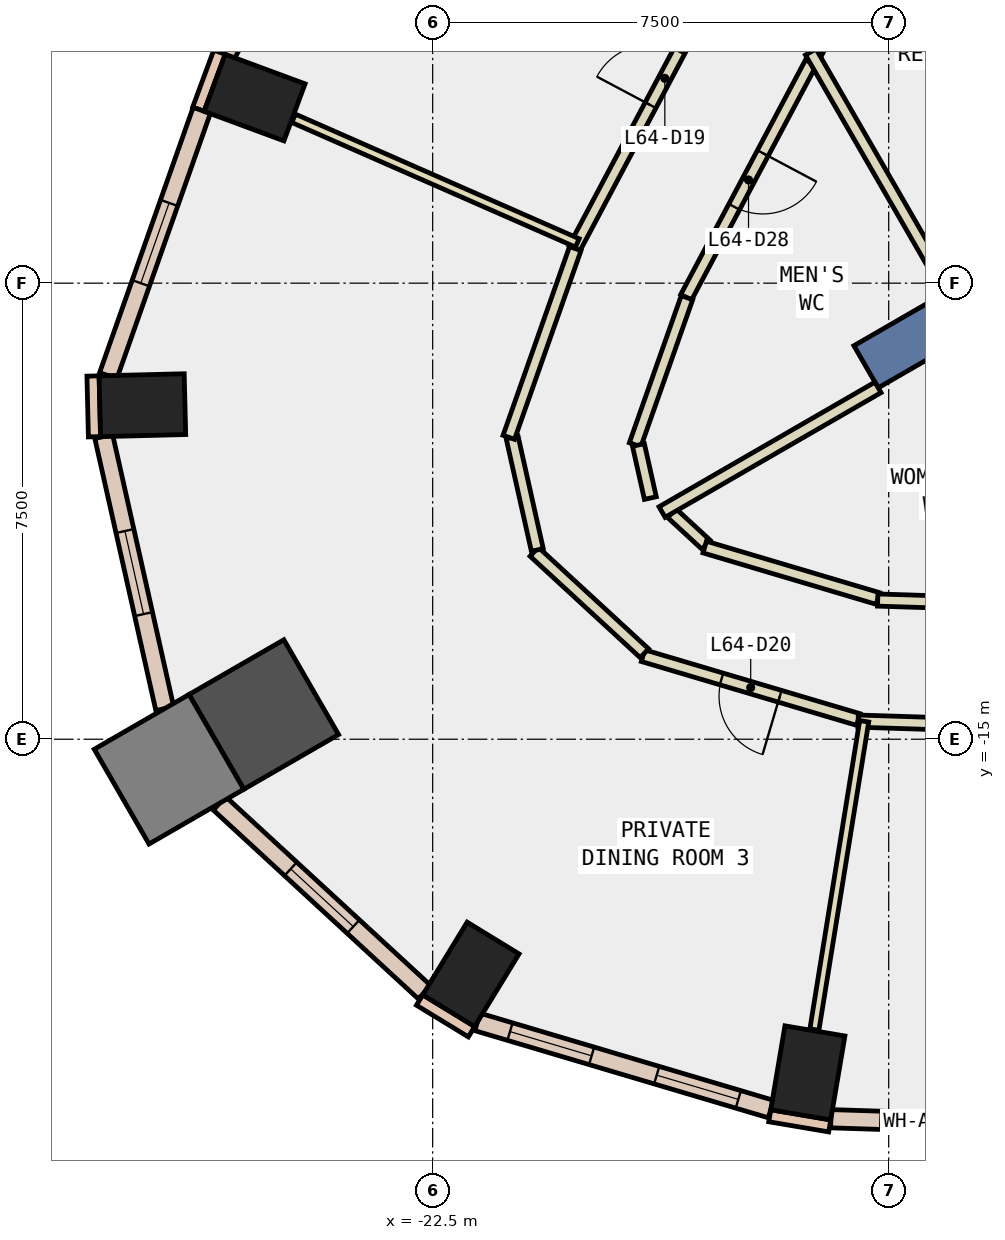
"""IFC4 building model, lengths in metres.
Left out: names, types, materials, properties, quantities, classifications, styles, units other than length and angle.
Written with IfcOpenShell. Run it as: python <this file> out.ifc"""

import sys

from ifc_helpers import new_model, si_unit, direction, frame, frame_2d, origin, origin_2d, place, context, subcontext, project, spatial, rectangle, extrude, element, fill, save


model = new_model("IFC4")
c1 = context("Model", 3, precision=1e-05, world=origin(), true_north=direction((0.0, 1.0)))
c2 = subcontext(c1, "Body", "Model", "MODEL_VIEW")
j1 = project(units=[si_unit("LENGTHUNIT", "METRE"), si_unit("PLANEANGLEUNIT", "RADIAN")], contexts=[c1])
p1 = place(None, origin())
s1 = spatial("IfcSite", under=j1, at=p1, CompositionType="ELEMENT")
p2 = place(p1, origin())
s2 = spatial("IfcBuilding", under=s1, at=p2, CompositionType="ELEMENT")
p3 = place(p2, frame((0.0, 0.0, 277.4)))
s3 = spatial("IfcBuildingStorey", under=s2, at=p3, CompositionType="ELEMENT", Elevation=277.4)
for number, where, z_axis, x_axis in (
    (1, (-16.33, -20.487, -0.34), (0.0, 0.0, 1.0), (-0.986, 0.167, 0.0)),
    (2, (-25.429, -4.448, -0.34), (0.0, 0.0, 1.0), (0.347, 0.938, 0.0)),
    (3, (-27.274, -9.507, -0.34), (0.0, 0.0, 1.0), (-0.025, 1.0, 0.0)),
):
    element("IfcColumn", number, at=place(p3, frame(where, z_axis=z_axis, x_axis=x_axis)), inside=s3, PredefinedType="COLUMN", context=c2, shape_type="SweptSolid", body=[
        extrude(rectangle(XDim=1.0, YDim=1.4, at=origin_2d()), origin(), (0.0, 0.0, 1.0), 3.34),
    ])
p4 = place(p3, frame((-25.277, -14.594, -0.34), z_axis=(0.0, 0.0, 1.0), x_axis=(0.866025403784, 0.5, 0.0)))
e4 = element("IfcColumn", 4, at=p4, inside=s3, PredefinedType="COLUMN", context=c2, shape_type="SweptSolid", body=[
    extrude(rectangle(XDim=1.8, YDim=1.8, at=origin_2d()), origin(), (0.0, 0.0, 1.0), 3.34),
])
p5 = place(p3, frame((-21.871, -18.867, -0.34), z_axis=(0.0, 0.0, 1.0), x_axis=(-0.853341581839, 0.521352227103, 0.0)))
e5 = element("IfcColumn", 5, at=p5, inside=s3, PredefinedType="COLUMN", context=c2, shape_type="SweptSolid", body=[
    extrude(rectangle(XDim=1.0, YDim=1.4, at=origin_2d()), origin(), (0.0, 0.0, 1.0), 3.34),
])
p6 = place(p3, frame((-26.836, -15.494, -0.34), z_axis=(0.0, 0.0, 1.0), x_axis=(0.866025403784, 0.5, 0.0)))
e6 = element("IfcColumn", 6, at=p6, inside=s3, PredefinedType="COLUMN", context=c2, shape_type="SweptSolid", body=[
    extrude(rectangle(XDim=1.8, YDim=1.8, at=origin_2d()), origin(), (0.0, 0.0, 1.0), 3.34),
])
p7 = place(p3, frame((-7.578, -4.375, -0.34), z_axis=(0.0, 0.0, 1.0), x_axis=(-0.866024315419, -0.5000018851, 0.0)))
e7 = element("IfcWall", 7, at=p7, inside=s3, PredefinedType="SHEAR", context=c2, shape_type="SweptSolid", body=[
    extrude(rectangle(XDim=9.0, YDim=0.8, at=frame_2d((4.5, 0.0))), origin(), (0.0, 0.0, 1.0), 3.34),
])
p8 = place(p3, frame((-26.006, -3.702, 0.0), z_axis=(0.0, 0.0, 1.0), x_axis=(-0.346892928577, -0.937904737222, 0.0)))
e8 = element("IfcWall", 8, at=p8, inside=s3, PredefinedType="STANDARD", context=c2, shape_type="SweptSolid", body=[
    extrude(rectangle(XDim=1.0, YDim=0.2, at=frame_2d((0.5, 0.0))), origin(), (0.0, 0.0, 1.0), 3.0),
])
p9 = place(p3, frame((-16.956, -21.192, 0.0), z_axis=(0.0, 0.0, 1.0), x_axis=(0.985961725342, -0.166971483074, 0.0)))
e9 = element("IfcWall", 9, at=p9, inside=s3, PredefinedType="STANDARD", context=c2, shape_type="SweptSolid", body=[
    extrude(rectangle(XDim=1.0, YDim=0.2, at=frame_2d((0.5, 0.0))), origin(), (0.0, 0.0, 1.0), 3.0),
])
p10 = place(p3, frame((-28.086, -9.027, 0.0), z_axis=(0.0, 0.0, 1.0), x_axis=(0.023948152966, -0.999713201858, 0.0)))
e10 = element("IfcWall", 10, at=p10, inside=s3, PredefinedType="STANDARD", context=c2, shape_type="SweptSolid", body=[
    extrude(rectangle(XDim=0.999, YDim=0.2, at=frame_2d((0.5, 0.0))), origin(), (0.0, 0.0, 1.0), 3.0),
])
p11 = place(p3, frame((-22.715, -19.289, 0.0), z_axis=(0.0, 0.0, 1.0), x_axis=(0.853679739553, -0.520798331677, 0.0)))
e11 = element("IfcWall", 11, at=p11, inside=s3, PredefinedType="STANDARD", context=c2, shape_type="SweptSolid", body=[
    extrude(rectangle(XDim=1.0, YDim=0.2, at=frame_2d((0.5, 0.0))), origin(), (0.0, 0.0, 1.0), 3.0),
])
p12 = place(p3, frame((-15.951, -21.241, 0.0), z_axis=(0.0, 0.0, 1.0), x_axis=(0.999496876383, -0.031717410046, 0.0)))
e12 = element("IfcWall", 12, at=p12, inside=s3, PredefinedType="STANDARD", context=c2, shape_type="SweptSolid", body=[
    extrude(rectangle(XDim=7.659, YDim=0.3, at=frame_2d((3.83, 0.0))), origin(), (0.0, 0.0, 1.0), 3.0),
])
p13 = place(p12, frame((0.815, 0.0, 0.9)))
e13 = element("IfcOpeningElement", 13, at=p13, cuts=e12, PredefinedType="OPENING", context=c2, shape_type="SweptSolid", body=[
    extrude(rectangle(XDim=2.2, YDim=2.0, at=frame_2d((1.1, 1.0))), frame((0.0, 0.16, 0.0), z_axis=(0.0, -1.0, 0.0), x_axis=(1.0, 0.0, 0.0)), (0.0, 0.0, 1.0), 0.32),
])
p14 = place(p12, frame((4.644, 0.0, 0.9)))
e14 = element("IfcOpeningElement", 14, at=p14, cuts=e12, PredefinedType="OPENING", context=c2, shape_type="SweptSolid", body=[
    extrude(rectangle(XDim=2.2, YDim=2.0, at=frame_2d((1.1, 1.0))), frame((0.0, 0.16, 0.0), z_axis=(0.0, -1.0, 0.0), x_axis=(1.0, 0.0, 0.0)), (0.0, 0.0, 1.0), 0.32),
])
p15 = place(p3, frame((-23.186, 1.348, 0.0), z_axis=(0.0, 0.0, 1.0), x_axis=(-0.469691596427, -0.882830563724, 0.0)))
e15 = element("IfcWall", 15, at=p15, inside=s3, PredefinedType="STANDARD", context=c2, shape_type="SweptSolid", body=[
    extrude(rectangle(XDim=5.768, YDim=0.3, at=frame_2d((2.884, 0.0))), origin(), (0.0, 0.0, 1.0), 3.0),
])
p16 = place(p15, frame((0.492, 0.0, 0.9)))
e16 = element("IfcOpeningElement", 16, at=p16, cuts=e15, PredefinedType="OPENING", context=c2, shape_type="SweptSolid", body=[
    extrude(rectangle(XDim=1.9, YDim=2.0, at=frame_2d((0.95, 1.0))), frame((0.0, 0.16, 0.0), z_axis=(0.0, -1.0, 0.0), x_axis=(1.0, 0.0, 0.0)), (0.0, 0.0, 1.0), 0.32),
])
p17 = place(p15, frame((3.376, 0.0, 0.9)))
e17 = element("IfcOpeningElement", 17, at=p17, cuts=e15, PredefinedType="OPENING", context=c2, shape_type="SweptSolid", body=[
    extrude(rectangle(XDim=1.9, YDim=2.0, at=frame_2d((0.95, 1.0))), frame((0.0, 0.16, 0.0), z_axis=(0.0, -1.0, 0.0), x_axis=(1.0, 0.0, 0.0)), (0.0, 0.0, 1.0), 0.32),
])
p18 = place(p3, frame((-26.298, -4.659, 0.0), z_axis=(0.0, 0.0, 1.0), x_axis=(-0.332491532378, -0.943106240514, 0.0)))
e18 = element("IfcWall", 18, at=p18, inside=s3, PredefinedType="STANDARD", context=c2, shape_type="SweptSolid", body=[
    extrude(rectangle(XDim=4.625, YDim=0.3, at=frame_2d((2.312, 0.0))), origin(), (0.0, 0.0, 1.0), 3.0),
])
p19 = place(p18, frame((1.613, 0.0, 0.9)))
e19 = element("IfcOpeningElement", 19, at=p19, cuts=e18, PredefinedType="OPENING", context=c2, shape_type="SweptSolid", body=[
    extrude(rectangle(XDim=1.4, YDim=2.0, at=frame_2d((0.7, 1.0))), frame((0.0, 0.16, 0.0), z_axis=(0.0, -1.0, 0.0), x_axis=(1.0, 0.0, 0.0)), (0.0, 0.0, 1.0), 0.32),
])
p20 = place(p3, frame((-27.91, -10.022, 0.0), z_axis=(0.0, 0.0, 1.0), x_axis=(0.218936963279, -0.975739005119, 0.0)))
e20 = element("IfcWall", 20, at=p20, inside=s3, PredefinedType="STANDARD", context=c2, shape_type="SweptSolid", body=[
    extrude(rectangle(XDim=4.585, YDim=0.3, at=frame_2d((2.293, 0.0))), origin(), (0.0, 0.0, 1.0), 3.0),
])
p21 = place(p20, frame((1.593, 0.0, 0.9)))
e21 = element("IfcOpeningElement", 21, at=p21, cuts=e20, PredefinedType="OPENING", context=c2, shape_type="SweptSolid", body=[
    extrude(rectangle(XDim=1.4, YDim=2.0, at=frame_2d((0.7, 1.0))), frame((0.0, 0.16, 0.0), z_axis=(0.0, -1.0, 0.0), x_axis=(1.0, 0.0, 0.0)), (0.0, 0.0, 1.0), 0.32),
])
p22 = place(p3, frame((-26.007, -16.054, 0.0), z_axis=(0.0, 0.0, 1.0), x_axis=(0.735631679486, -0.677381747714, 0.0)))
e22 = element("IfcWall", 22, at=p22, inside=s3, PredefinedType="STANDARD", context=c2, shape_type="SweptSolid", body=[
    extrude(rectangle(XDim=4.585, YDim=0.3, at=frame_2d((2.292, 0.0))), origin(), (0.0, 0.0, 1.0), 3.0),
])
p23 = place(p22, frame((1.593, 0.0, 0.9)))
e23 = element("IfcOpeningElement", 23, at=p23, cuts=e22, PredefinedType="OPENING", context=c2, shape_type="SweptSolid", body=[
    extrude(rectangle(XDim=1.4, YDim=2.0, at=frame_2d((0.7, 1.0))), frame((0.0, 0.16, 0.0), z_axis=(0.0, -1.0, 0.0), x_axis=(1.0, 0.0, 0.0)), (0.0, 0.0, 1.0), 0.32),
])
p24 = place(p3, frame((-21.764, -19.649, 0.0), z_axis=(0.0, 0.0, 1.0), x_axis=(0.95864045837, -0.284619872067, 0.0)))
e24 = element("IfcWall", 24, at=p24, inside=s3, PredefinedType="STANDARD", context=c2, shape_type="SweptSolid", body=[
    extrude(rectangle(XDim=5.035, YDim=0.3, at=frame_2d((2.518, 0.0))), origin(), (0.0, 0.0, 1.0), 3.0),
])
p25 = place(p24, frame((0.559, 0.0, 0.9)))
e25 = element("IfcOpeningElement", 25, at=p25, cuts=e24, PredefinedType="OPENING", context=c2, shape_type="SweptSolid", body=[
    extrude(rectangle(XDim=1.4, YDim=2.0, at=frame_2d((0.7, 1.0))), frame((0.0, 0.16, 0.0), z_axis=(0.0, -1.0, 0.0), x_axis=(1.0, 0.0, 0.0)), (0.0, 0.0, 1.0), 0.32),
])
p26 = place(p24, frame((3.076, 0.0, 0.9)))
e26 = element("IfcOpeningElement", 26, at=p26, cuts=e24, PredefinedType="OPENING", context=c2, shape_type="SweptSolid", body=[
    extrude(rectangle(XDim=1.4, YDim=2.0, at=frame_2d((0.7, 1.0))), frame((0.0, 0.16, 0.0), z_axis=(0.0, -1.0, 0.0), x_axis=(1.0, 0.0, 0.0)), (0.0, 0.0, 1.0), 0.32),
])
p27 = place(p3, frame((-15.439, -2.293, 0.0), z_axis=(0.0, 0.0, 1.0), x_axis=(-0.469248780065, -0.883066012486, 0.0)))
e27 = element("IfcWall", 27, at=p27, inside=s3, PredefinedType="PARTITIONING", context=c2, shape_type="SweptSolid", body=[
    extrude(rectangle(XDim=1.59, YDim=0.2, at=frame_2d((0.795, 0.0))), origin(), (0.0, 0.0, 1.0), 3.0),
])
p28 = place(p3, frame((-16.279, -3.873, 0.0), z_axis=(0.0, 0.0, 1.0), x_axis=(-0.469587967357, -0.882885689608, 0.0)))
e28 = element("IfcWall", 28, at=p28, inside=s3, PredefinedType="PARTITIONING", context=c2, shape_type="SweptSolid", body=[
    extrude(rectangle(XDim=4.372, YDim=0.2, at=frame_2d((2.186, 0.0))), origin(), (0.0, 0.0, 1.0), 3.0),
])
p29 = place(p28, frame((1.686, 0.0, 0.0)))
e29 = element("IfcOpeningElement", 29, at=p29, cuts=e28, PredefinedType="OPENING", context=c2, shape_type="SweptSolid", body=[
    extrude(rectangle(XDim=1.0, YDim=2.1, at=frame_2d((0.5, 1.05))), frame((0.0, 0.11, 0.0), z_axis=(0.0, -1.0, 0.0), x_axis=(1.0, 0.0, 0.0)), (0.0, 0.0, 1.0), 0.22),
])
p30 = place(p3, frame((-18.318, -7.739, 0.0), z_axis=(0.0, 0.0, 1.0), x_axis=(-0.332486504777, -0.943108012977, 0.0)))
e30 = element("IfcWall", 30, at=p30, inside=s3, PredefinedType="PARTITIONING", context=c2, shape_type="SweptSolid", body=[
    extrude(rectangle(XDim=2.565, YDim=0.2, at=frame_2d((1.282, 0.0))), origin(), (0.0, 0.0, 1.0), 3.0),
])
p31 = place(p3, frame((-19.116, -10.161, 0.0), z_axis=(0.0, 0.0, 1.0), x_axis=(0.219096654714, -0.975703159723, 0.0)))
e31 = element("IfcWall", 31, at=p31, inside=s3, PredefinedType="PARTITIONING", context=c2, shape_type="SweptSolid", body=[
    extrude(rectangle(XDim=0.895, YDim=0.2, at=frame_2d((0.447, 0.0))), origin(), (0.0, 0.0, 1.0), 3.0),
])
p32 = place(p3, frame((-18.567, -11.282, 0.0), z_axis=(0.0, 0.0, 1.0), x_axis=(0.735218904444, -0.677829744514, 0.0)))
e32 = element("IfcWall", 32, at=p32, inside=s3, PredefinedType="PARTITIONING", context=c2, shape_type="SweptSolid", body=[
    extrude(rectangle(XDim=0.766, YDim=0.2, at=frame_2d((0.383, 0.0))), origin(), (0.0, 0.0, 1.0), 3.0),
])
p33 = place(p3, frame((-18.026, -11.84, 0.0), z_axis=(0.0, 0.0, 1.0), x_axis=(0.958629704259, -0.284656090947, 0.0)))
e33 = element("IfcWall", 33, at=p33, inside=s3, PredefinedType="PARTITIONING", context=c2, shape_type="SweptSolid", body=[
    extrude(rectangle(XDim=2.972, YDim=0.2, at=frame_2d((1.486, 0.0))), origin(), (0.0, 0.0, 1.0), 3.0),
])
p34 = place(p3, frame((-15.181, -12.711, 0.0), z_axis=(0.0, 0.0, 1.0), x_axis=(0.999491493959, -0.031886572471, 0.0)))
e34 = element("IfcWall", 34, at=p34, inside=s3, PredefinedType="PARTITIONING", context=c2, shape_type="SweptSolid", body=[
    extrude(rectangle(XDim=4.081, YDim=0.2, at=frame_2d((2.041, 0.0))), origin(), (0.0, 0.0, 1.0), 3.0),
])
p35 = place(p34, frame((1.541, 0.0, 0.0)))
e35 = element("IfcOpeningElement", 35, at=p35, cuts=e34, PredefinedType="OPENING", context=c2, shape_type="SweptSolid", body=[
    extrude(rectangle(XDim=1.0, YDim=2.1, at=frame_2d((0.5, 1.05))), frame((0.0, 0.11, 0.0), z_axis=(0.0, -1.0, 0.0), x_axis=(1.0, 0.0, 0.0)), (0.0, 0.0, 1.0), 0.22),
])
p36 = place(p3, frame((-20.168, -6.926, 0.0), z_axis=(0.0, 0.0, 1.0), x_axis=(0.469552838911, 0.882904372778, 0.0)))
e36 = element("IfcWall", 36, at=p36, inside=s3, PredefinedType="PARTITIONING", context=c2, shape_type="SweptSolid", body=[
    extrude(rectangle(XDim=6.329, YDim=0.2, at=frame_2d((3.165, 0.0))), origin(), (0.0, 0.0, 1.0), 3.0),
])
p37 = place(p36, frame((2.665, 0.0, 0.0)))
e37 = element("IfcOpeningElement", 37, at=p37, cuts=e36, PredefinedType="OPENING", context=c2, shape_type="SweptSolid", body=[
    extrude(rectangle(XDim=1.0, YDim=2.1, at=frame_2d((0.5, 1.05))), frame((0.0, 0.11, 0.0), z_axis=(0.0, -1.0, 0.0), x_axis=(1.0, 0.0, 0.0)), (0.0, 0.0, 1.0), 0.22),
])
p38 = place(p3, frame((-15.499, -14.676, 0.0), z_axis=(0.0, 0.0, 1.0), x_axis=(-0.958734738219, 0.284302131073, 0.0)))
e38 = element("IfcWall", 38, at=p38, inside=s3, PredefinedType="PARTITIONING", context=c2, shape_type="SweptSolid", body=[
    extrude(rectangle(XDim=3.693, YDim=0.2, at=frame_2d((1.847, 0.0))), origin(), (0.0, 0.0, 1.0), 3.0),
])
p39 = place(p38, frame((1.347, 0.0, 0.0)))
e39 = element("IfcOpeningElement", 39, at=p39, cuts=e38, PredefinedType="OPENING", context=c2, shape_type="SweptSolid", body=[
    extrude(rectangle(XDim=1.0, YDim=2.1, at=frame_2d((0.5, 1.05))), frame((0.0, 0.11, 0.0), z_axis=(0.0, -1.0, 0.0), x_axis=(1.0, 0.0, 0.0)), (0.0, 0.0, 1.0), 0.22),
])
p40 = place(p3, frame((-19.018, -13.586, 0.0), z_axis=(0.0, 0.0, 1.0), x_axis=(-0.735547704352, 0.67747293276, 0.0)))
e40 = element("IfcWall", 40, at=p40, inside=s3, PredefinedType="PARTITIONING", context=c2, shape_type="SweptSolid", body=[
    extrude(rectangle(XDim=2.463, YDim=0.2, at=frame_2d((1.232, 0.0))), origin(), (0.0, 0.0, 1.0), 3.0),
])
p41 = place(p3, frame((-20.779, -11.887, 0.0), z_axis=(0.0, 0.0, 1.0), x_axis=(-0.218540107266, 0.975827967173, 0.0)))
e41 = element("IfcWall", 41, at=p41, inside=s3, PredefinedType="PARTITIONING", context=c2, shape_type="SweptSolid", body=[
    extrude(rectangle(XDim=1.895, YDim=0.2, at=frame_2d((0.947, 0.0))), origin(), (0.0, 0.0, 1.0), 3.0),
])
p42 = place(p3, frame((-21.248, -10.035, 0.0), z_axis=(0.0, 0.0, 1.0), x_axis=(0.332233916116, 0.943197023417, 0.0)))
e42 = element("IfcWall", 42, at=p42, inside=s3, PredefinedType="PARTITIONING", context=c2, shape_type="SweptSolid", body=[
    extrude(rectangle(XDim=3.29, YDim=0.2, at=frame_2d((1.645, 0.0))), origin(), (0.0, 0.0, 1.0), 3.0),
])
p43 = place(p3, frame((-7.7, -14.95, 0.0), z_axis=(0.0, 0.0, 1.0), x_axis=(-0.999495120537, 0.031772693047, 0.0)))
e43 = element("IfcWall", 43, at=p43, inside=s3, PredefinedType="PARTITIONING", context=c2, shape_type="SweptSolid", body=[
    extrude(rectangle(XDim=7.807, YDim=0.2, at=frame_2d((3.903, 0.0))), origin(), (0.0, 0.0, 1.0), 3.0),
])
p44 = place(p43, frame((3.403, 0.0, 0.0)))
e44 = element("IfcOpeningElement", 44, at=p44, cuts=e43, PredefinedType="OPENING", context=c2, shape_type="SweptSolid", body=[
    extrude(rectangle(XDim=1.0, YDim=2.1, at=frame_2d((0.5, 1.05))), frame((0.0, 0.11, 0.0), z_axis=(0.0, -1.0, 0.0), x_axis=(1.0, 0.0, 0.0)), (0.0, 0.0, 1.0), 0.22),
])
p45 = place(p3, frame((-14.079, -7.514, 0.0), z_axis=(0.0, 0.0, 1.0), x_axis=(-0.499959077901, 0.86604902888, 0.0)))
e45 = element("IfcWall", 45, at=p45, inside=s3, PredefinedType="PARTITIONING", context=c2, shape_type="SweptSolid", body=[
    extrude(rectangle(XDim=4.406, YDim=0.2, at=frame_2d((2.203, 0.0))), origin(), (0.0, 0.0, 1.0), 3.0),
])
p46 = place(p3, frame((-15.176, -9.214, 0.0), z_axis=(0.0, 0.0, 1.0), x_axis=(-0.86606561423, -0.499930346997, 0.0)))
e46 = element("IfcWall", 46, at=p46, inside=s3, PredefinedType="PARTITIONING", context=c2, shape_type="SweptSolid", body=[
    extrude(rectangle(XDim=4.1, YDim=0.2, at=frame_2d((2.05, 0.0))), origin(), (0.0, 0.0, 1.0), 3.0),
])
p47 = place(p3, frame((-20.121, -6.838, 0.0), z_axis=(0.0, 0.0, 1.0), x_axis=(-0.91561994307, 0.402044922679, 0.0)))
e47 = element("IfcWall", 47, at=p47, inside=s3, PredefinedType="PARTITIONING", context=c2, shape_type="SweptSolid", body=[
    extrude(rectangle(XDim=5.096, YDim=0.15, at=frame_2d((2.548, 0.0))), origin(), (0.0, 0.0, 1.0), 3.0),
])
p48 = place(p3, frame((-15.403, -14.705, 0.0), z_axis=(0.0, 0.0, 1.0), x_axis=(-0.159447664828, -0.98720638277, 0.0)))
e48 = element("IfcWall", 48, at=p48, inside=s3, PredefinedType="PARTITIONING", context=c2, shape_type="SweptSolid", body=[
    extrude(rectangle(XDim=5.135, YDim=0.15, at=frame_2d((2.568, 0.0))), origin(), (0.0, 0.0, 1.0), 3.0),
])
p49 = place(p13, origin())
e49 = element("IfcWindow", 49, at=p49, inside=s3, PartitioningType="SINGLE_PANEL", PredefinedType="WINDOW", context=c2, shape_type="SweptSolid", body=[
    extrude(rectangle(XDim=2.2, YDim=2.0, at=frame_2d((1.1, 1.0))), frame((0.0, 0.03, 0.0), z_axis=(0.0, -1.0, 0.0), x_axis=(1.0, 0.0, 0.0)), (0.0, 0.0, 1.0), 0.06),
])
fill(e13, e49)
p50 = place(p19, origin())
e50 = element("IfcWindow", 50, at=p50, inside=s3, PartitioningType="SINGLE_PANEL", PredefinedType="WINDOW", context=c2, shape_type="SweptSolid", body=[
    extrude(rectangle(XDim=1.4, YDim=2.0, at=frame_2d((0.7, 1.0))), frame((0.0, 0.03, 0.0), z_axis=(0.0, -1.0, 0.0), x_axis=(1.0, 0.0, 0.0)), (0.0, 0.0, 1.0), 0.06),
])
fill(e19, e50)
p51 = place(p21, origin())
e51 = element("IfcWindow", 51, at=p51, inside=s3, PartitioningType="SINGLE_PANEL", PredefinedType="WINDOW", context=c2, shape_type="SweptSolid", body=[
    extrude(rectangle(XDim=1.4, YDim=2.0, at=frame_2d((0.7, 1.0))), frame((0.0, 0.03, 0.0), z_axis=(0.0, -1.0, 0.0), x_axis=(1.0, 0.0, 0.0)), (0.0, 0.0, 1.0), 0.06),
])
fill(e21, e51)
p52 = place(p23, origin())
e52 = element("IfcWindow", 52, at=p52, inside=s3, PartitioningType="SINGLE_PANEL", PredefinedType="WINDOW", context=c2, shape_type="SweptSolid", body=[
    extrude(rectangle(XDim=1.4, YDim=2.0, at=frame_2d((0.7, 1.0))), frame((0.0, 0.03, 0.0), z_axis=(0.0, -1.0, 0.0), x_axis=(1.0, 0.0, 0.0)), (0.0, 0.0, 1.0), 0.06),
])
fill(e23, e52)
p53 = place(p25, origin())
e53 = element("IfcWindow", 53, at=p53, inside=s3, PartitioningType="SINGLE_PANEL", PredefinedType="WINDOW", context=c2, shape_type="SweptSolid", body=[
    extrude(rectangle(XDim=1.4, YDim=2.0, at=frame_2d((0.7, 1.0))), frame((0.0, 0.03, 0.0), z_axis=(0.0, -1.0, 0.0), x_axis=(1.0, 0.0, 0.0)), (0.0, 0.0, 1.0), 0.06),
])
fill(e25, e53)
p54 = place(p26, origin())
e54 = element("IfcWindow", 54, at=p54, inside=s3, PartitioningType="SINGLE_PANEL", PredefinedType="WINDOW", context=c2, shape_type="SweptSolid", body=[
    extrude(rectangle(XDim=1.4, YDim=2.0, at=frame_2d((0.7, 1.0))), frame((0.0, 0.03, 0.0), z_axis=(0.0, -1.0, 0.0), x_axis=(1.0, 0.0, 0.0)), (0.0, 0.0, 1.0), 0.06),
])
fill(e26, e54)
p55 = place(p37, origin())
e55 = element("IfcDoor", 55, at=p55, inside=s3, OperationType="SINGLE_SWING_LEFT", PredefinedType="DOOR", context=c2, shape_type="SweptSolid", body=[
    extrude(rectangle(XDim=1.0, YDim=2.1, at=frame_2d((0.5, 1.05))), frame((0.0, 0.025, 0.0), z_axis=(0.0, -1.0, 0.0), x_axis=(1.0, 0.0, 0.0)), (0.0, 0.0, 1.0), 0.05),
])
fill(e37, e55)
p56 = place(p39, origin())
e56 = element("IfcDoor", 56, at=p56, inside=s3, OperationType="SINGLE_SWING_LEFT", PredefinedType="DOOR", context=c2, shape_type="SweptSolid", body=[
    extrude(rectangle(XDim=1.0, YDim=2.1, at=frame_2d((0.5, 1.05))), frame((0.0, 0.025, 0.0), z_axis=(0.0, -1.0, 0.0), x_axis=(1.0, 0.0, 0.0)), (0.0, 0.0, 1.0), 0.05),
])
fill(e39, e56)
p57 = place(p29, origin())
e57 = element("IfcDoor", 57, at=p57, inside=s3, OperationType="SINGLE_SWING_LEFT", PredefinedType="DOOR", context=c2, shape_type="SweptSolid", body=[
    extrude(rectangle(XDim=1.0, YDim=2.1, at=frame_2d((0.5, 1.05))), frame((0.0, 0.025, 0.0), z_axis=(0.0, -1.0, 0.0), x_axis=(1.0, 0.0, 0.0)), (0.0, 0.0, 1.0), 0.05),
])
fill(e29, e57)
save(model, sys.argv[1])
